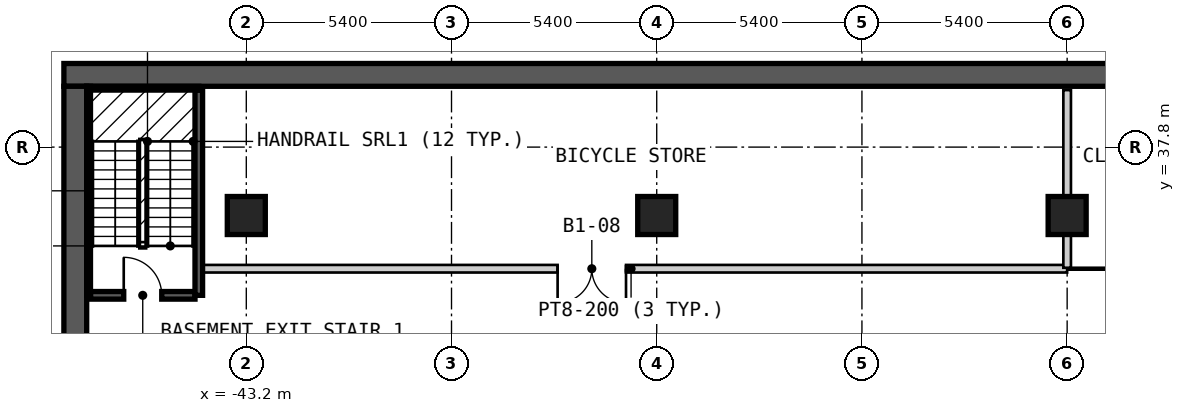
"""IFC4 building model, lengths in metres.
Left out: names, types, materials, properties, quantities, classifications, styles, units other than length and angle.
Written with IfcOpenShell. Run it as: python <this file> out.ifc"""

import sys

from ifc_helpers import new_model, si_unit, direction, frame, frame_2d, origin, origin_2d, place, context, subcontext, project, spatial, rectangle, extrude, element, fill, save


model = new_model("IFC4")
c1 = context("Model", 3, precision=1e-05, world=origin(), true_north=direction((0.0, 1.0)))
c2 = subcontext(c1, "Body", "Model", "MODEL_VIEW")
j1 = project(units=[si_unit("LENGTHUNIT", "METRE"), si_unit("PLANEANGLEUNIT", "RADIAN")], contexts=[c1])
p1 = place(None, origin())
s1 = spatial("IfcSite", under=j1, at=p1, CompositionType="ELEMENT")
p2 = place(p1, origin())
s2 = spatial("IfcBuilding", under=s1, at=p2, CompositionType="ELEMENT")
p3 = place(p2, frame((0.0, 0.0, -4.2)))
s3 = spatial("IfcBuildingStorey", under=s2, at=p3, CompositionType="ELEMENT", Elevation=-4.2)
p4 = place(p3, frame((-48.0, 39.7, 0.0), z_axis=(0.0, 0.0, 1.0), x_axis=(1.0, 0.0, 0.0)))
e1 = element("IfcWall", 1, at=p4, inside=s3, PredefinedType="SOLIDWALL", context=c2, shape_type="SweptSolid", body=[
    extrude(rectangle(XDim=96.0, YDim=0.6, at=frame_2d((48.0, 0.0))), origin(), (0.0, 0.0, 1.0), 4.2),
])
p5 = place(p3, frame((-47.7, -31.4, 0.0), z_axis=(0.0, 0.0, 1.0), x_axis=(0.0, 1.0, 0.0)))
e2 = element("IfcWall", 2, at=p5, inside=s3, PredefinedType="SOLIDWALL", context=c2, shape_type="SweptSolid", body=[
    extrude(rectangle(XDim=70.8, YDim=0.6, at=frame_2d((35.4, 0.0))), origin(), (0.0, 0.0, 1.0), 4.2),
])
for number, where, z_axis, x_axis in (
    (3, (-43.2, 36.0, 0.0), (0.0, 0.0, 1.0), (1.0, 0.0, 0.0)),
    (4, (-32.4, 36.0, 0.0), (0.0, 0.0, 1.0), (1.0, 0.0, 0.0)),
    (5, (-21.6, 36.0, 0.0), (0.0, 0.0, 1.0), (1.0, 0.0, 0.0)),
):
    element("IfcColumn", number, at=place(p3, frame(where, z_axis=z_axis, x_axis=x_axis)), inside=s3, PredefinedType="COLUMN", context=c2, shape_type="SweptSolid", body=[
        extrude(rectangle(XDim=1.0, YDim=1.0, at=origin_2d()), origin(), (0.0, 0.0, 1.0), 4.2),
    ])
p6 = place(p3, frame((-47.3, 33.9, 0.0), z_axis=(0.0, 0.0, 1.0), x_axis=(1.0, 0.0, 0.0)))
e6 = element("IfcWall", 6, at=p6, inside=s3, PredefinedType="SOLIDWALL", context=c2, shape_type="SweptSolid", body=[
    extrude(rectangle(XDim=2.75, YDim=0.2, at=frame_2d((1.375, 0.0))), origin(), (0.0, 0.0, 1.0), 3.75),
])
p7 = place(p6, frame((0.875, 0.0, 0.0)))
e7 = element("IfcOpeningElement", 7, at=p7, cuts=e6, PredefinedType="OPENING", context=c2, shape_type="SweptSolid", body=[
    extrude(rectangle(XDim=1.0, YDim=2.1, at=frame_2d((0.5, 1.05))), frame((0.0, 0.11, 0.0), z_axis=(0.0, -1.0, 0.0), x_axis=(1.0, 0.0, 0.0)), (0.0, 0.0, 1.0), 0.22),
])
p8 = place(p3, frame((-21.6, 34.6, 0.0), z_axis=(0.0, 0.0, 1.0), x_axis=(1.0, 0.0, 0.0)))
e8 = element("IfcWall", 8, at=p8, inside=s3, PredefinedType="PARTITIONING", context=c2, shape_type="SweptSolid", body=[
    extrude(rectangle(XDim=5.5, YDim=0.05, at=frame_2d((2.75, 0.0))), origin(), (0.0, 0.0, 1.0), 3.75),
])
p9 = place(p8, frame((3.15, 0.0, 0.0), z_axis=(0.0, 0.0, 1.0), x_axis=(-1.0, 0.0, 0.0)))
e9 = element("IfcOpeningElement", 9, at=p9, cuts=e8, PredefinedType="OPENING", context=c2, shape_type="SweptSolid", body=[
    extrude(rectangle(XDim=0.9, YDim=2.1, at=frame_2d((0.45, 1.05))), frame((0.0, 0.035, 0.0), z_axis=(0.0, -1.0, 0.0), x_axis=(1.0, 0.0, 0.0)), (0.0, 0.0, 1.0), 0.07),
])
p10 = place(p3, frame((-44.55, 34.6, 0.0), z_axis=(0.0, 0.0, 1.0), x_axis=(1.0, 0.0, 0.0)))
e10 = element("IfcWall", 10, at=p10, inside=s3, PredefinedType="PARTITIONING", context=c2, shape_type="SweptSolid", body=[
    extrude(rectangle(XDim=22.95, YDim=0.2, at=frame_2d((11.475, 0.0))), origin(), (0.0, 0.0, 1.0), 3.75),
])
p11 = place(p10, frame((11.342, 0.0, 0.0), z_axis=(0.0, 0.0, 1.0), x_axis=(-1.0, 0.0, 0.0)))
e11 = element("IfcOpeningElement", 11, at=p11, cuts=e10, PredefinedType="OPENING", context=c2, shape_type="SweptSolid", body=[
    extrude(rectangle(XDim=1.8, YDim=2.1, at=frame_2d((0.9, 1.05))), frame((0.0, 0.11, 0.0), z_axis=(0.0, -1.0, 0.0), x_axis=(1.0, 0.0, 0.0)), (0.0, 0.0, 1.0), 0.22),
])
p12 = place(p3, frame((-44.45, 33.9, 0.0), z_axis=(0.0, 0.0, 1.0), x_axis=(0.0, 1.0, 0.0)))
e12 = element("IfcWall", 12, at=p12, inside=s3, PredefinedType="SOLIDWALL", context=c2, shape_type="SweptSolid", body=[
    extrude(rectangle(XDim=5.4, YDim=0.2, at=frame_2d((2.7, 0.0))), origin(), (0.0, 0.0, 1.0), 3.75),
])
p13 = place(p3, frame((-21.6, 34.625, 0.0), z_axis=(0.0, 0.0, 1.0), x_axis=(0.0, 1.0, 0.0)))
e13 = element("IfcWall", 13, at=p13, inside=s3, PredefinedType="PARTITIONING", context=c2, shape_type="SweptSolid", body=[
    extrude(rectangle(XDim=4.675, YDim=0.2, at=frame_2d((2.337, 0.0))), origin(), (0.0, 0.0, 1.0), 3.75),
])
p14 = place(p3, frame((-47.35, 33.9, 0.0), z_axis=(0.0, 0.0, 1.0), x_axis=(0.0, 1.0, 0.0)))
e14 = element("IfcWall", 14, at=p14, inside=s3, PredefinedType="SOLIDWALL", context=c2, shape_type="SweptSolid", body=[
    extrude(rectangle(XDim=5.5, YDim=0.1, at=frame_2d((2.75, 0.0))), origin(), (0.0, 0.0, 1.0), 3.75),
])
p15 = place(p3, frame((-47.4, 39.35, 0.0), z_axis=(0.0, 0.0, 1.0), x_axis=(1.0, 0.0, 0.0)))
e15 = element("IfcWall", 15, at=p15, inside=s3, PredefinedType="SOLIDWALL", context=c2, shape_type="SweptSolid", body=[
    extrude(rectangle(XDim=2.95, YDim=0.1, at=frame_2d((1.475, 0.0))), origin(), (0.0, 0.0, 1.0), 3.75),
])
p16 = place(p7, origin())
e16 = element("IfcDoor", 16, at=p16, inside=s3, OperationType="SINGLE_SWING_LEFT", PredefinedType="DOOR", context=c2, shape_type="SweptSolid", body=[
    extrude(rectangle(XDim=1.0, YDim=2.1, at=frame_2d((0.5, 1.05))), frame((0.0, 0.025, 0.0), z_axis=(0.0, -1.0, 0.0), x_axis=(1.0, 0.0, 0.0)), (0.0, 0.0, 1.0), 0.05),
])
fill(e7, e16)
p17 = place(p11, origin())
e17 = element("IfcDoor", 17, at=p17, inside=s3, OperationType="DOUBLE_DOOR_SINGLE_SWING", PredefinedType="DOOR", context=c2, shape_type="SweptSolid", body=[
    extrude(rectangle(XDim=1.8, YDim=2.1, at=frame_2d((0.9, 1.05))), frame((0.0, 0.025, 0.0), z_axis=(0.0, -1.0, 0.0), x_axis=(1.0, 0.0, 0.0)), (0.0, 0.0, 1.0), 0.05),
])
fill(e11, e17)
save(model, sys.argv[1])
